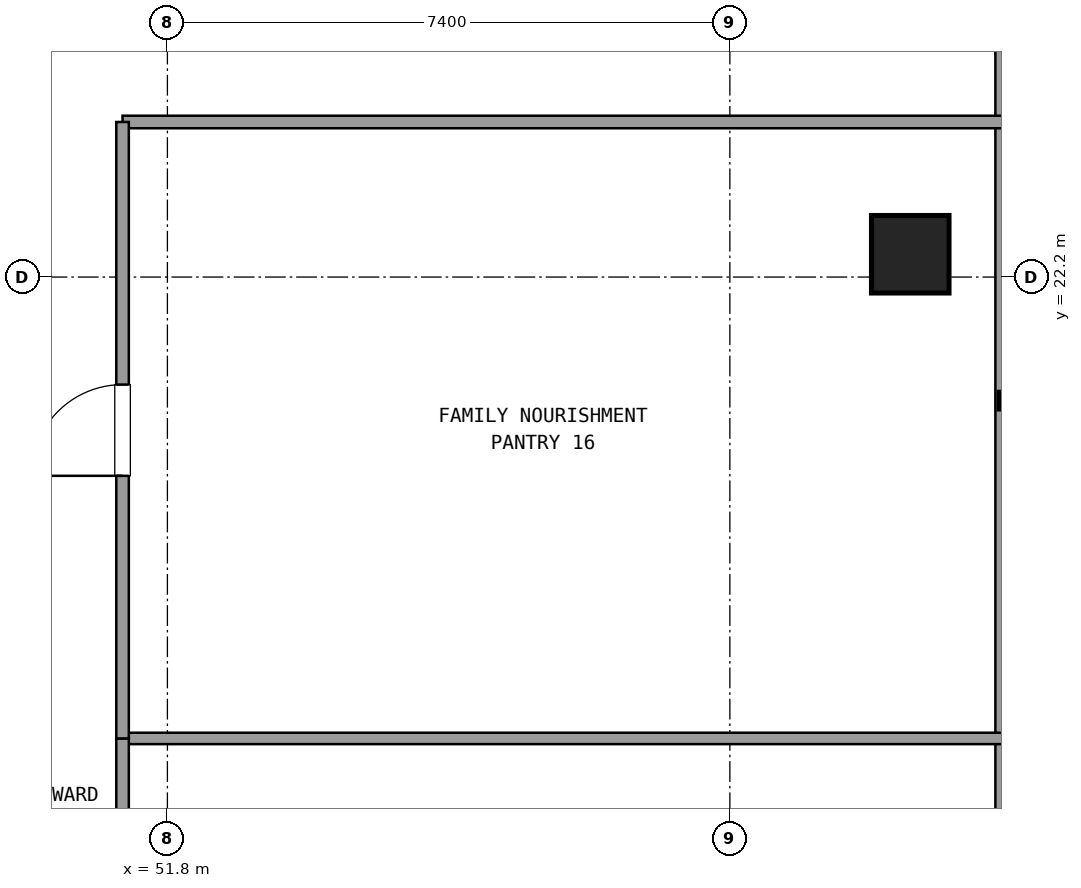
"""IFC4 building model, lengths in metres.
Left out: names, types, materials, properties, quantities, classifications, styles, units other than length and angle.
Written with IfcOpenShell. Run it as: python <this file> out.ifc"""

import sys

from ifc_helpers import new_model, si_unit, direction, frame, frame_2d, origin, origin_2d, place, context, subcontext, project, spatial, rectangle, extrude, element, fill, save


model = new_model("IFC4")
c1 = context("Model", 3, precision=1e-05, world=origin(), true_north=direction((0.0, 1.0)))
c2 = subcontext(c1, "Body", "Model", "MODEL_VIEW")
j1 = project(units=[si_unit("LENGTHUNIT", "METRE"), si_unit("PLANEANGLEUNIT", "RADIAN")], contexts=[c1])
p1 = place(None, origin())
s1 = spatial("IfcSite", under=j1, at=p1, CompositionType="ELEMENT")
p2 = place(p1, origin())
s2 = spatial("IfcBuilding", under=s1, at=p2, CompositionType="ELEMENT")
p3 = place(p2, frame((0.0, 0.0, 99.18)))
s3 = spatial("IfcBuildingStorey", under=s2, at=p3, CompositionType="ELEMENT", Elevation=99.18)
p4 = place(p3, frame((61.573, 22.5, 0.021), z_axis=(-0.084573087246, 0.0, 0.99641727851), x_axis=(0.0, -1.0, 0.0)))
e1 = element("IfcColumn", 1, at=p4, inside=s3, PredefinedType="COLUMN", context=c2, shape_type="SweptSolid", body=[
    extrude(rectangle(XDim=1.02, YDim=1.02, at=origin_2d()), origin(), (0.0, 0.0, 1.0), 3.571),
])
p5 = place(p3, frame((62.813, 9.921, 0.0), z_axis=(0.0, 0.0, 1.0), x_axis=(0.0, 1.0, 0.0)))
e2 = element("IfcWall", 2, at=p5, inside=s3, PredefinedType="SOLIDWALL", context=c2, shape_type="SweptSolid", body=[
    extrude(rectangle(XDim=31.958, YDim=0.24, at=frame_2d((15.979, 0.0))), origin(), (0.0, 0.0, 1.0), 0.85),
])
p6 = place(p3, frame((51.21, 24.24, 0.0), z_axis=(0.0, 0.0, 1.0), x_axis=(1.0, 0.0, 0.0)))
e3 = element("IfcWall", 3, at=p6, inside=s3, PredefinedType="PARTITIONING", context=c2, shape_type="SweptSolid", body=[
    extrude(rectangle(XDim=11.583, YDim=0.165, at=frame_2d((5.792, 0.0))), origin(), (0.0, 0.0, 1.0), 2.61),
])
p7 = place(p3, frame((51.21, 16.13, 0.0), z_axis=(0.0, 0.0, 1.0), x_axis=(1.0, 0.0, 0.0)))
e4 = element("IfcWall", 4, at=p7, inside=s3, PredefinedType="PARTITIONING", context=c2, shape_type="SweptSolid", body=[
    extrude(rectangle(XDim=11.583, YDim=0.15, at=frame_2d((5.792, 0.0))), origin(), (0.0, 0.0, 1.0), 2.61),
])
p8 = place(p3, frame((51.21, 3.965, 0.0), z_axis=(0.0, 0.0, 1.0), x_axis=(0.0, 1.0, 0.0)))
e5 = element("IfcWall", 5, at=p8, inside=s3, PredefinedType="PARTITIONING", context=c2, shape_type="SweptSolid", body=[
    extrude(rectangle(XDim=12.165, YDim=0.165, at=frame_2d((6.083, 0.0))), origin(), (0.0, 0.0, 1.0), 2.61),
])
p9 = place(p8, frame((5.482, 0.0, 0.0)))
e6 = element("IfcOpeningElement", 6, at=p9, cuts=e5, PredefinedType="OPENING", context=c2, shape_type="SweptSolid", body=[
    extrude(rectangle(XDim=1.2, YDim=2.15, at=frame_2d((0.6, 1.075))), frame((0.0, 0.093, 0.0), z_axis=(0.0, -1.0, 0.0), x_axis=(1.0, 0.0, 0.0)), (0.0, 0.0, 1.0), 0.185),
])
p10 = place(p3, frame((51.21, 16.13, 0.0), z_axis=(0.0, 0.0, 1.0), x_axis=(0.0, 1.0, 0.0)))
e7 = element("IfcWall", 7, at=p10, inside=s3, PredefinedType="PARTITIONING", context=c2, shape_type="SweptSolid", body=[
    extrude(rectangle(XDim=8.11, YDim=0.165, at=frame_2d((4.055, 0.0))), origin(), (0.0, 0.0, 1.0), 2.61),
])
p11 = place(p10, frame((3.455, 0.0, 0.0)))
e8 = element("IfcOpeningElement", 8, at=p11, cuts=e7, PredefinedType="OPENING", context=c2, shape_type="SweptSolid", body=[
    extrude(rectangle(XDim=1.2, YDim=2.15, at=frame_2d((0.6, 1.075))), frame((0.0, 0.093, 0.0), z_axis=(0.0, -1.0, 0.0), x_axis=(1.0, 0.0, 0.0)), (0.0, 0.0, 1.0), 0.185),
])
p12 = place(p11, origin())
e9 = element("IfcDoor", 9, at=p12, inside=s3, OperationType="SINGLE_SWING_LEFT", PredefinedType="DOOR", context=c2, shape_type="SweptSolid", body=[
    extrude(rectangle(XDim=1.2, YDim=2.15, at=frame_2d((0.6, 1.075))), frame((0.0, 0.025, 0.0), z_axis=(0.0, -1.0, 0.0), x_axis=(1.0, 0.0, 0.0)), (0.0, 0.0, 1.0), 0.05),
])
fill(e8, e9)
save(model, sys.argv[1])
